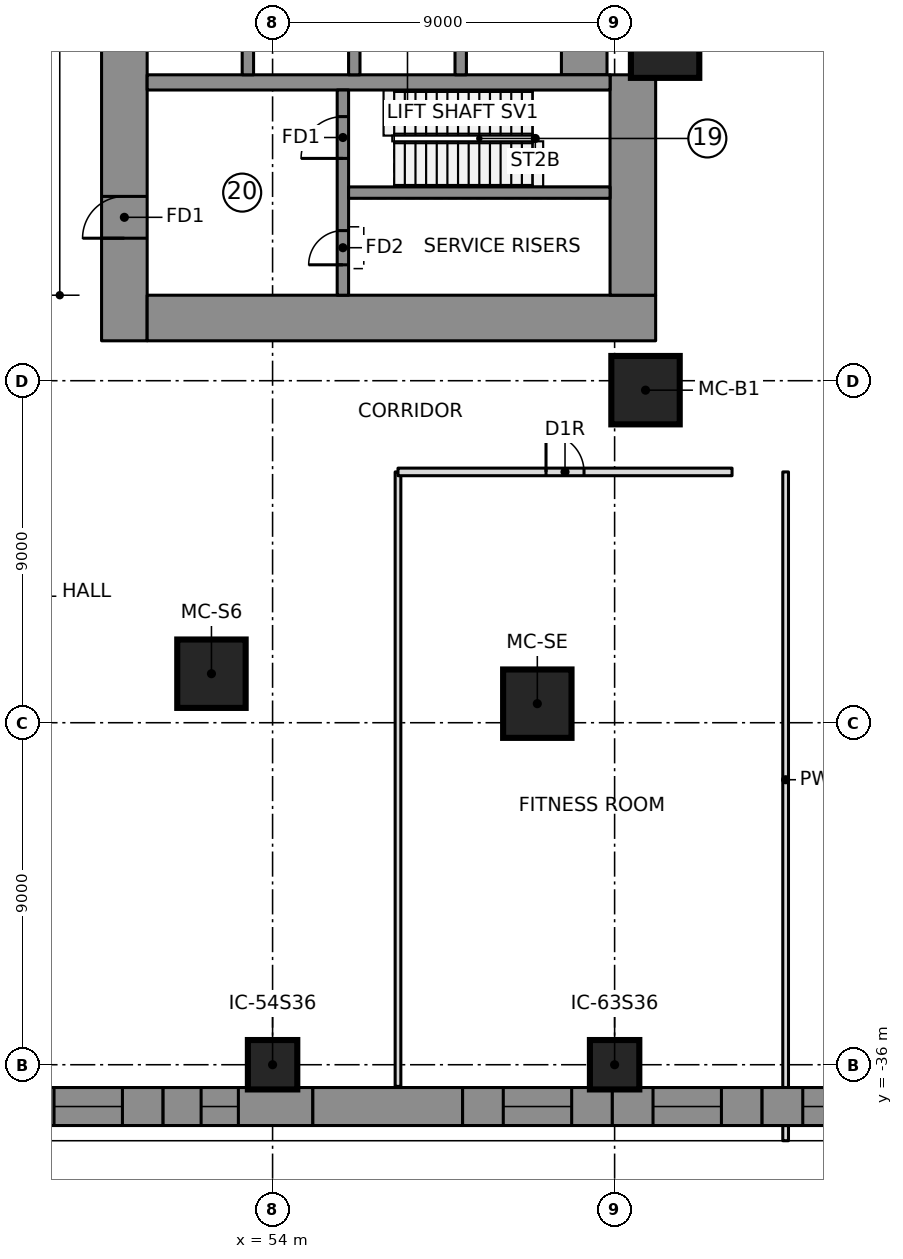
"""IFC4 building model, lengths in metres.
Left out: names, types, materials, properties, quantities, classifications, styles, units other than length and angle.
Written with IfcOpenShell. Run it as: python <this file> out.ifc"""

import sys

from ifc_helpers import new_model, si_unit, direction, frame, frame_2d, origin, origin_2d, place, context, subcontext, project, spatial, polyline, rectangle, outline, extrude, element, fill, save


model = new_model("IFC4")
c1 = context("Model", 3, precision=1e-05, world=origin(), true_north=direction((0.0, 1.0)))
c2 = subcontext(c1, "Body", "Model", "MODEL_VIEW")
j1 = project(units=[si_unit("LENGTHUNIT", "METRE"), si_unit("PLANEANGLEUNIT", "RADIAN")], contexts=[c1])
p1 = place(None, origin())
s1 = spatial("IfcSite", under=j1, at=p1, CompositionType="ELEMENT")
p2 = place(p1, origin())
s2 = spatial("IfcBuilding", under=s1, at=p2, CompositionType="ELEMENT")
p3 = place(p2, frame((0.0, 0.0, 19.0)))
s3 = spatial("IfcBuildingStorey", under=s2, at=p3, CompositionType="ELEMENT", Elevation=19.0)
p4 = place(p3, frame((50.1, -16.95, 0.0), z_axis=(0.0, 0.0, 1.0), x_axis=(0.0, 1.0, 0.0)))
e1 = element("IfcWall", 1, at=p4, inside=s3, PredefinedType="SHEAR", context=c2, shape_type="SweptSolid", body=[
    extrude(rectangle(XDim=10.3, YDim=1.2, at=frame_2d((5.15, 0.0))), origin(), (0.0, 0.0, 1.0), 5.0),
])
p5 = place(p4, frame((2.7, 0.0, 0.0)))
e2 = element("IfcOpeningElement", 2, at=p5, cuts=e1, PredefinedType="OPENING", context=c2, shape_type="SweptSolid", body=[
    extrude(rectangle(XDim=1.1, YDim=2.1, at=frame_2d((0.55, 1.05))), frame((0.0, 0.61, 0.0), z_axis=(0.0, -1.0, 0.0), x_axis=(1.0, 0.0, 0.0)), (0.0, 0.0, 1.0), 1.22),
])
p6 = place(p3, frame((50.7, -16.35, 0.0), z_axis=(0.0, 0.0, 1.0), x_axis=(1.0, 0.0, 0.0)))
e3 = element("IfcWall", 3, at=p6, inside=s3, PredefinedType="SHEAR", context=c2, shape_type="SweptSolid", body=[
    extrude(rectangle(XDim=13.38, YDim=1.2, at=frame_2d((6.69, 0.0))), origin(), (0.0, 0.0, 1.0), 5.0),
])
p7 = place(p3, frame((63.48, -15.75, 0.0), z_axis=(0.0, 0.0, 1.0), x_axis=(0.0, 1.0, 0.0)))
e4 = element("IfcWall", 4, at=p7, inside=s3, PredefinedType="SHEAR", context=c2, shape_type="SweptSolid", body=[
    extrude(rectangle(XDim=5.8, YDim=1.2, at=frame_2d((2.9, 0.0))), origin(), (0.0, 0.0, 1.0), 5.0),
])
p8 = place(p3, frame((62.2, -9.95, 0.0), z_axis=(0.0, 0.0, 1.0), x_axis=(0.0, 1.0, 0.0)))
e5 = element("IfcWall", 5, at=p8, inside=s3, PredefinedType="SHEAR", context=c2, shape_type="SweptSolid", body=[
    extrude(rectangle(XDim=19.9, YDim=1.2, at=frame_2d((9.95, 0.0))), origin(), (0.0, 0.0, 1.0), 5.0),
])
p9 = place(p3, frame((50.7, -10.15, 0.0), z_axis=(0.0, 0.0, 1.0), x_axis=(1.0, 0.0, 0.0)))
e6 = element("IfcWall", 6, at=p9, inside=s3, PredefinedType="SHEAR", context=c2, shape_type="SweptSolid", body=[
    extrude(rectangle(XDim=12.18, YDim=0.4, at=frame_2d((6.09, 0.0))), origin(), (0.0, 0.0, 1.0), 5.0),
])
for number, where, z_axis, x_axis in (
    (7, (53.35, -9.95, 0.0), (0.0, 0.0, 1.0), (0.0, 1.0, 0.0)),
    (8, (56.15, -9.95, 0.0), (0.0, 0.0, 1.0), (0.0, 1.0, 0.0)),
    (9, (58.95, -9.95, 0.0), (0.0, 0.0, 1.0), (0.0, 1.0, 0.0)),
):
    element("IfcWall", number, at=place(p3, frame(where, z_axis=z_axis, x_axis=x_axis)), inside=s3, PredefinedType="SHEAR", context=c2, shape_type="SweptSolid", body=[
        extrude(rectangle(XDim=3.0, YDim=0.3, at=frame_2d((1.5, 0.0))), origin(), (0.0, 0.0, 1.0), 5.0),
    ])
p10 = place(p3, frame((55.85, -15.75, 0.0), z_axis=(0.0, 0.0, 1.0), x_axis=(0.0, 1.0, 0.0)))
e10 = element("IfcWall", 10, at=p10, inside=s3, PredefinedType="SHEAR", context=c2, shape_type="SweptSolid", body=[
    extrude(rectangle(XDim=5.4, YDim=0.3, at=frame_2d((2.7, 0.0))), origin(), (0.0, 0.0, 1.0), 5.0),
])
p11 = place(p10, frame((3.6, 0.0, 0.0)))
e11 = element("IfcOpeningElement", 11, at=p11, cuts=e10, PredefinedType="OPENING", context=c2, shape_type="SweptSolid", body=[
    extrude(rectangle(XDim=1.1, YDim=2.1, at=frame_2d((0.55, 1.05))), frame((0.0, 0.16, 0.0), z_axis=(0.0, -1.0, 0.0), x_axis=(1.0, 0.0, 0.0)), (0.0, 0.0, 1.0), 0.32),
])
p12 = place(p10, frame((0.8, 0.0, 0.0)))
e12 = element("IfcOpeningElement", 12, at=p12, cuts=e10, PredefinedType="OPENING", context=c2, shape_type="SweptSolid", body=[
    extrude(rectangle(XDim=0.9, YDim=2.1, at=frame_2d((0.45, 1.05))), frame((0.0, 0.16, 0.0), z_axis=(0.0, -1.0, 0.0), x_axis=(1.0, 0.0, 0.0)), (0.0, 0.0, 1.0), 0.32),
])
p13 = place(p3, frame((56.0, -13.05, 0.0), z_axis=(0.0, 0.0, 1.0), x_axis=(1.0, 0.0, 0.0)))
e13 = element("IfcWall", 13, at=p13, inside=s3, PredefinedType="SHEAR", context=c2, shape_type="SweptSolid", body=[
    extrude(rectangle(XDim=6.88, YDim=0.3, at=frame_2d((3.44, 0.0))), origin(), (0.0, 0.0, 1.0), 5.0),
])
for number, where, z_axis, x_axis in (
    (14, (52.392, -25.71, 0.0), (0.0, 0.0, 1.0), (1.0, 0.0, 0.0)),
    (15, (60.966, -26.499, 0.0), (0.0, 0.0, 1.0), (1.0, 0.0, 0.0)),
    (16, (63.813, -18.249, 0.0), (0.0, 0.0, 1.0), (1.0, 0.0, 0.0)),
    (17, (64.328, -9.131, 0.0), (0.0, 0.0, 1.0), (1.0, 0.0, 0.0)),
):
    element("IfcColumn", number, at=place(p3, frame(where, z_axis=z_axis, x_axis=x_axis)), inside=s3, PredefinedType="COLUMN", context=c2, shape_type="SweptSolid", body=[
        extrude(rectangle(XDim=1.8, YDim=1.8, at=origin_2d()), origin(), (0.0, 0.0, 1.0), 5.0),
    ])
for number, where, z_axis, x_axis in (
    (18, (54.0, -36.0, 0.0), (0.0, 0.0, 1.0), (1.0, 0.0, 0.0)),
    (19, (63.0, -36.0, 0.0), (0.0, 0.0, 1.0), (1.0, 0.0, 0.0)),
):
    element("IfcColumn", number, at=place(p3, frame(where, z_axis=z_axis, x_axis=x_axis)), inside=s3, PredefinedType="COLUMN", context=c2, shape_type="SweptSolid", body=[
        extrude(rectangle(XDim=1.3, YDim=1.3, at=origin_2d()), origin(), (0.0, 0.0, 1.0), 5.0),
    ])
p14 = place(p3, frame((47.179, -37.1, 0.0), z_axis=(0.0, 0.0, 1.0), x_axis=(1.0, 0.0, 0.0)))
e20 = element("IfcWall", 20, at=p14, inside=s3, PredefinedType="NOTDEFINED", context=c2, shape_type="SweptSolid", body=[
    extrude(outline(polyline([(-0.1, -0.5), (3.94, -0.5), (3.94, 0.5), (0.1, 0.5), (-0.1, -0.5)])), origin(), (0.0, 0.0, 1.0), 4.7),
])
p15 = place(p14, frame((1.07, 0.0, 0.9)))
e21 = element("IfcOpeningElement", 21, at=p15, cuts=e20, PredefinedType="OPENING", context=c2, shape_type="SweptSolid", body=[
    extrude(rectangle(XDim=1.8, YDim=2.4, at=frame_2d((0.9, 1.2))), frame((0.0, 0.51, 0.0), z_axis=(0.0, -1.0, 0.0), x_axis=(1.0, 0.0, 0.0)), (0.0, 0.0, 1.0), 1.02),
])
p16 = place(p3, frame((51.119, -37.1, 0.0), z_axis=(0.0, 0.0, 1.0), x_axis=(1.0, 0.0, 0.0)))
e22 = element("IfcWall", 22, at=p16, inside=s3, PredefinedType="NOTDEFINED", context=c2, shape_type="SweptSolid", body=[
    extrude(outline(polyline([(0.0, -0.5), (3.94, -0.5), (3.94, 0.5), (0.0, 0.5), (0.0, -0.5)])), origin(), (0.0, 0.0, 1.0), 4.7),
])
p17 = place(p16, frame((1.0, 0.0, 0.9)))
e23 = element("IfcOpeningElement", 23, at=p17, cuts=e22, PredefinedType="OPENING", context=c2, shape_type="SweptSolid", body=[
    extrude(rectangle(XDim=0.981, YDim=2.4, at=frame_2d((0.49, 1.2))), frame((0.0, 0.51, 0.0), z_axis=(0.0, -1.0, 0.0), x_axis=(1.0, 0.0, 0.0)), (0.0, 0.0, 1.0), 1.02),
])
p18 = place(p3, frame((55.06, -37.1, 0.0), z_axis=(0.0, 0.0, 1.0), x_axis=(1.0, 0.0, 0.0)))
e24 = element("IfcWall", 24, at=p18, inside=s3, PredefinedType="NOTDEFINED", context=c2, shape_type="SweptSolid", body=[
    extrude(outline(polyline([(0.0, -0.5), (3.94, -0.5), (3.94, 0.5), (0.0, 0.5), (0.0, -0.5)])), origin(), (0.0, 0.0, 1.0), 4.7),
])
p19 = place(p3, frame((59.0, -37.1, 0.0), z_axis=(0.0, 0.0, 1.0), x_axis=(1.0, 0.0, 0.0)))
e25 = element("IfcWall", 25, at=p19, inside=s3, PredefinedType="NOTDEFINED", context=c2, shape_type="SweptSolid", body=[
    extrude(outline(polyline([(0.0, -0.5), (3.94, -0.5), (3.94, 0.5), (0.0, 0.5), (0.0, -0.5)])), origin(), (0.0, 0.0, 1.0), 4.7),
])
p20 = place(p19, frame((1.07, 0.0, 0.9)))
e26 = element("IfcOpeningElement", 26, at=p20, cuts=e25, PredefinedType="OPENING", context=c2, shape_type="SweptSolid", body=[
    extrude(rectangle(XDim=1.8, YDim=2.4, at=frame_2d((0.9, 1.2))), frame((0.0, 0.51, 0.0), z_axis=(0.0, -1.0, 0.0), x_axis=(1.0, 0.0, 0.0)), (0.0, 0.0, 1.0), 1.02),
])
p21 = place(p3, frame((62.94, -37.1, 0.0), z_axis=(0.0, 0.0, 1.0), x_axis=(1.0, 0.0, 0.0)))
e27 = element("IfcWall", 27, at=p21, inside=s3, PredefinedType="NOTDEFINED", context=c2, shape_type="SweptSolid", body=[
    extrude(outline(polyline([(0.0, -0.5), (3.94, -0.5), (3.94, 0.5), (0.0, 0.5), (0.0, -0.5)])), origin(), (0.0, 0.0, 1.0), 4.7),
])
p22 = place(p21, frame((1.07, 0.0, 0.9)))
e28 = element("IfcOpeningElement", 28, at=p22, cuts=e27, PredefinedType="OPENING", context=c2, shape_type="SweptSolid", body=[
    extrude(rectangle(XDim=1.8, YDim=2.4, at=frame_2d((0.9, 1.2))), frame((0.0, 0.51, 0.0), z_axis=(0.0, -1.0, 0.0), x_axis=(1.0, 0.0, 0.0)), (0.0, 0.0, 1.0), 1.02),
])
p23 = place(p3, frame((66.881, -37.1, 0.0), z_axis=(0.0, 0.0, 1.0), x_axis=(1.0, 0.0, 0.0)))
e29 = element("IfcWall", 29, at=p23, inside=s3, PredefinedType="NOTDEFINED", context=c2, shape_type="SweptSolid", body=[
    extrude(outline(polyline([(0.0, -0.5), (4.04, -0.5), (3.841, 0.5), (0.0, 0.5), (0.0, -0.5)])), origin(), (0.0, 0.0, 1.0), 4.7),
])
p24 = place(p23, frame((1.07, 0.0, 0.9)))
e30 = element("IfcOpeningElement", 30, at=p24, cuts=e29, PredefinedType="OPENING", context=c2, shape_type="SweptSolid", body=[
    extrude(rectangle(XDim=1.8, YDim=2.4, at=frame_2d((0.9, 1.2))), frame((0.0, 0.51, 0.0), z_axis=(0.0, -1.0, 0.0), x_axis=(1.0, 0.0, 0.0)), (0.0, 0.0, 1.0), 1.02),
])
p25 = place(p3, frame((57.3, -36.57, 0.0), z_axis=(0.0, 0.0, 1.0), x_axis=(0.0, 1.0, 0.0)))
e31 = element("IfcWall", 31, at=p25, inside=s3, PredefinedType="PARTITIONING", context=c2, shape_type="SweptSolid", body=[
    extrude(rectangle(XDim=16.17, YDim=0.15, at=frame_2d((8.085, 0.0))), origin(), (0.0, 0.0, 1.0), 4.65),
])
p26 = place(p3, frame((67.5, -38.0, 0.0), z_axis=(0.0, 0.0, 1.0), x_axis=(0.0, 1.0, 0.0)))
e32 = element("IfcWall", 32, at=p26, inside=s3, PredefinedType="PARTITIONING", context=c2, shape_type="SweptSolid", body=[
    extrude(rectangle(XDim=0.4, YDim=0.15, at=frame_2d((0.2, 0.0))), origin(), (0.0, 0.0, 1.0), 4.65),
])
p27 = place(p3, frame((67.5, -36.6, 0.0), z_axis=(0.0, 0.0, 1.0), x_axis=(0.0, 1.0, 0.0)))
e33 = element("IfcWall", 33, at=p27, inside=s3, PredefinedType="PARTITIONING", context=c2, shape_type="SweptSolid", body=[
    extrude(rectangle(XDim=16.2, YDim=0.15, at=frame_2d((8.1, 0.0))), origin(), (0.0, 0.0, 1.0), 4.65),
])
p28 = place(p3, frame((57.3, -20.4, 0.0), z_axis=(0.0, 0.0, 1.0), x_axis=(1.0, 0.0, 0.0)))
e34 = element("IfcWall", 34, at=p28, inside=s3, PredefinedType="PARTITIONING", context=c2, shape_type="SweptSolid", body=[
    extrude(rectangle(XDim=8.79, YDim=0.2, at=frame_2d((4.395, 0.0))), origin(), (0.0, 0.0, 1.0), 4.65),
])
p29 = place(p28, frame((3.895, 0.0, 0.0)))
e35 = element("IfcOpeningElement", 35, at=p29, cuts=e34, PredefinedType="OPENING", context=c2, shape_type="SweptSolid", body=[
    extrude(rectangle(XDim=1.0, YDim=2.1, at=frame_2d((0.5, 1.05))), frame((0.0, 0.11, 0.0), z_axis=(0.0, -1.0, 0.0), x_axis=(1.0, 0.0, 0.0)), (0.0, 0.0, 1.0), 0.22),
])
p30 = place(p15, origin())
e36 = element("IfcWindow", 36, at=p30, inside=s3, PartitioningType="SINGLE_PANEL", PredefinedType="WINDOW", context=c2, shape_type="SweptSolid", body=[
    extrude(rectangle(XDim=1.8, YDim=2.4, at=frame_2d((0.9, 1.2))), frame((0.0, 0.5, 0.0), z_axis=(0.0, -1.0, 0.0), x_axis=(1.0, 0.0, 0.0)), (0.0, 0.0, 1.0), 0.06),
])
fill(e21, e36)
p31 = place(p17, origin())
e37 = element("IfcWindow", 37, at=p31, inside=s3, PartitioningType="SINGLE_PANEL", PredefinedType="WINDOW", context=c2, shape_type="SweptSolid", body=[
    extrude(rectangle(XDim=0.981, YDim=2.4, at=frame_2d((0.49, 1.2))), frame((0.0, 0.5, 0.0), z_axis=(0.0, -1.0, 0.0), x_axis=(1.0, 0.0, 0.0)), (0.0, 0.0, 1.0), 0.06),
])
fill(e23, e37)
p32 = place(p20, origin())
e38 = element("IfcWindow", 38, at=p32, inside=s3, PartitioningType="SINGLE_PANEL", PredefinedType="WINDOW", context=c2, shape_type="SweptSolid", body=[
    extrude(rectangle(XDim=1.8, YDim=2.4, at=frame_2d((0.9, 1.2))), frame((0.0, 0.5, 0.0), z_axis=(0.0, -1.0, 0.0), x_axis=(1.0, 0.0, 0.0)), (0.0, 0.0, 1.0), 0.06),
])
fill(e26, e38)
p33 = place(p22, origin())
e39 = element("IfcWindow", 39, at=p33, inside=s3, PartitioningType="SINGLE_PANEL", PredefinedType="WINDOW", context=c2, shape_type="SweptSolid", body=[
    extrude(rectangle(XDim=1.8, YDim=2.4, at=frame_2d((0.9, 1.2))), frame((0.0, 0.5, 0.0), z_axis=(0.0, -1.0, 0.0), x_axis=(1.0, 0.0, 0.0)), (0.0, 0.0, 1.0), 0.06),
])
fill(e28, e39)
p34 = place(p24, origin())
e40 = element("IfcWindow", 40, at=p34, inside=s3, PartitioningType="SINGLE_PANEL", PredefinedType="WINDOW", context=c2, shape_type="SweptSolid", body=[
    extrude(rectangle(XDim=1.8, YDim=2.4, at=frame_2d((0.9, 1.2))), frame((0.0, 0.5, 0.0), z_axis=(0.0, -1.0, 0.0), x_axis=(1.0, 0.0, 0.0)), (0.0, 0.0, 1.0), 0.06),
])
fill(e30, e40)
p35 = place(p29, origin())
e41 = element("IfcDoor", 41, at=p35, inside=s3, OperationType="SINGLE_SWING_RIGHT", PredefinedType="DOOR", context=c2, shape_type="SweptSolid", body=[
    extrude(rectangle(XDim=1.0, YDim=2.1, at=frame_2d((0.5, 1.05))), frame((0.0, 0.025, 0.0), z_axis=(0.0, -1.0, 0.0), x_axis=(1.0, 0.0, 0.0)), (0.0, 0.0, 1.0), 0.05),
])
fill(e35, e41)
p36 = place(p11, origin())
e42 = element("IfcDoor", 42, at=p36, inside=s3, OperationType="SINGLE_SWING_RIGHT", PredefinedType="DOOR", context=c2, shape_type="SweptSolid", body=[
    extrude(rectangle(XDim=1.1, YDim=2.1, at=frame_2d((0.55, 1.05))), frame((0.0, 0.025, 0.0), z_axis=(0.0, -1.0, 0.0), x_axis=(1.0, 0.0, 0.0)), (0.0, 0.0, 1.0), 0.05),
])
fill(e11, e42)
p37 = place(p5, origin())
e43 = element("IfcDoor", 43, at=p37, inside=s3, OperationType="SINGLE_SWING_RIGHT", PredefinedType="DOOR", context=c2, shape_type="SweptSolid", body=[
    extrude(rectangle(XDim=1.1, YDim=2.1, at=frame_2d((0.55, 1.05))), frame((0.0, 0.025, 0.0), z_axis=(0.0, -1.0, 0.0), x_axis=(1.0, 0.0, 0.0)), (0.0, 0.0, 1.0), 0.05),
])
fill(e2, e43)
p38 = place(p12, origin())
e44 = element("IfcDoor", 44, at=p38, inside=s3, OperationType="SINGLE_SWING_LEFT", PredefinedType="DOOR", context=c2, shape_type="SweptSolid", body=[
    extrude(rectangle(XDim=0.9, YDim=2.1, at=frame_2d((0.45, 1.05))), frame((0.0, 0.025, 0.0), z_axis=(0.0, -1.0, 0.0), x_axis=(1.0, 0.0, 0.0)), (0.0, 0.0, 1.0), 0.05),
])
fill(e12, e44)
save(model, sys.argv[1])
